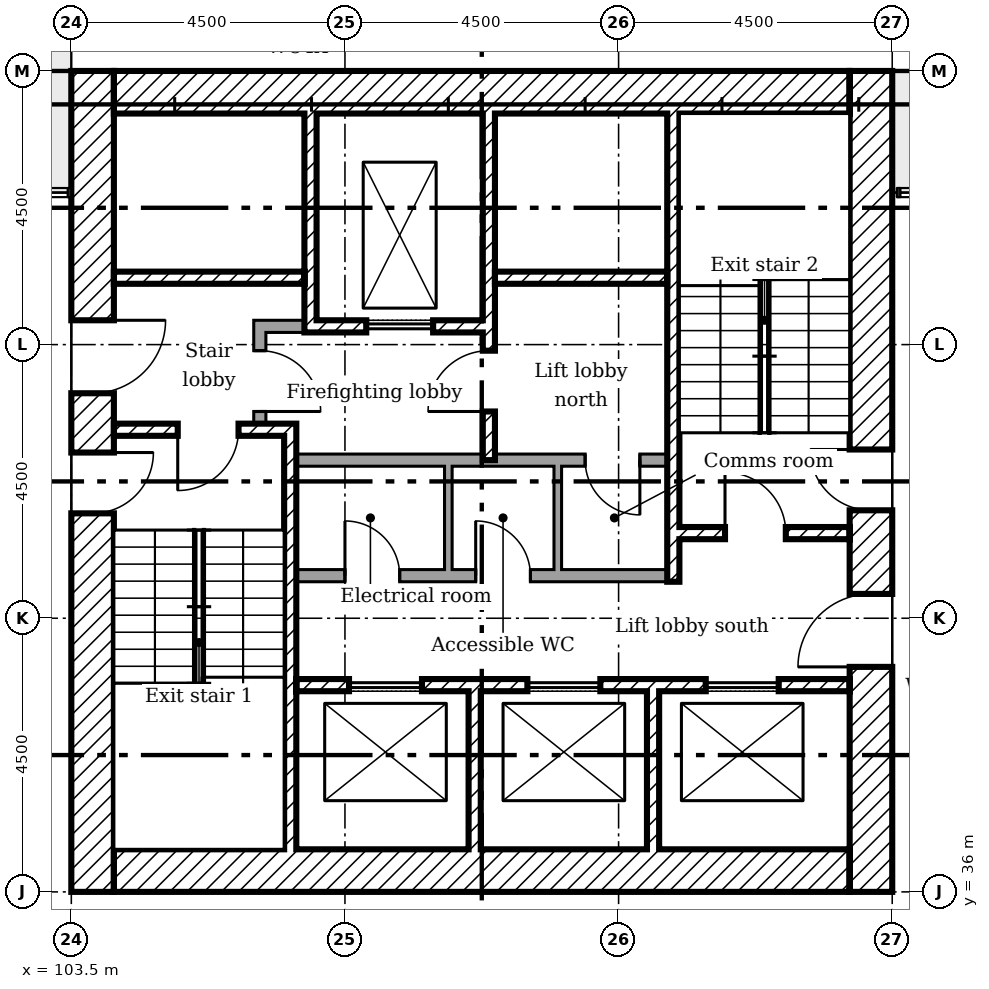
"""IFC4 building model, lengths in metres.
Left out: names, types, materials, properties, quantities, classifications, styles, units other than length and angle.
Written with IfcOpenShell. Run it as: python <this file> out.ifc"""

import sys

from ifc_helpers import new_model, si_unit, direction, frame, frame_2d, origin, place, context, subcontext, project, spatial, rectangle, extrude, element, fill, save


model = new_model("IFC4")
c1 = context("Model", 3, precision=1e-05, world=origin(), true_north=direction((0.0, 1.0)))
c2 = subcontext(c1, "Body", "Model", "MODEL_VIEW")
j1 = project(units=[si_unit("LENGTHUNIT", "METRE"), si_unit("PLANEANGLEUNIT", "RADIAN")], contexts=[c1])
p1 = place(None, origin())
s1 = spatial("IfcSite", under=j1, at=p1, CompositionType="ELEMENT")
p2 = place(p1, origin())
s2 = spatial("IfcBuilding", under=s1, at=p2, CompositionType="ELEMENT")
p3 = place(p2, frame((0.0, 0.0, 135.2)))
s3 = spatial("IfcBuildingStorey", under=s2, at=p3, CompositionType="ELEMENT", Elevation=135.2)
p4 = place(p3, frame((116.65, 36.0, 0.0), z_axis=(0.0, 0.0, 1.0), x_axis=(0.0, 1.0, 0.0)))
e1 = element("IfcWall", 1, at=p4, inside=s3, PredefinedType="SHEAR", context=c2, shape_type="SweptSolid", body=[
    extrude(rectangle(XDim=13.5, YDim=0.7, at=frame_2d((6.75, 0.0))), origin(), (0.0, 0.0, 1.0), 3.3),
])
p5 = place(p4, frame((3.7, 0.0, 0.0)))
e2 = element("IfcOpeningElement", 2, at=p5, cuts=e1, PredefinedType="OPENING", context=c2, shape_type="SweptSolid", body=[
    extrude(rectangle(XDim=1.2, YDim=2.1, at=frame_2d((0.6, 1.05))), frame((0.0, 0.36, 0.0), z_axis=(0.0, -1.0, 0.0), x_axis=(1.0, 0.0, 0.0)), (0.0, 0.0, 1.0), 0.72),
])
p6 = place(p4, frame((6.275, 0.0, 0.0)))
e3 = element("IfcOpeningElement", 3, at=p6, cuts=e1, PredefinedType="OPENING", context=c2, shape_type="SweptSolid", body=[
    extrude(rectangle(XDim=1.0, YDim=2.1, at=frame_2d((0.5, 1.05))), frame((0.0, 0.36, 0.0), z_axis=(0.0, -1.0, 0.0), x_axis=(1.0, 0.0, 0.0)), (0.0, 0.0, 1.0), 0.72),
])
for number, where in (
    (4, (104.2, 49.15, 0.0)),
    (5, (104.2, 36.35, 0.0)),
):
    element("IfcWall", number, at=place(p3, frame(where)), inside=s3, PredefinedType="SHEAR", context=c2, shape_type="SweptSolid", body=[
        extrude(rectangle(XDim=12.1, YDim=0.7, at=frame_2d((6.05, 0.0))), origin(), (0.0, 0.0, 1.0), 3.3),
    ])
p7 = place(p3, frame((103.85, 36.0, 0.0), z_axis=(0.0, 0.0, 1.0), x_axis=(0.0, 1.0, 0.0)))
e6 = element("IfcWall", 6, at=p7, inside=s3, PredefinedType="SHEAR", context=c2, shape_type="SweptSolid", body=[
    extrude(rectangle(XDim=13.5, YDim=0.7, at=frame_2d((6.75, 0.0))), origin(), (0.0, 0.0, 1.0), 3.3),
])
p8 = place(p7, frame((8.2, 0.0, 0.0)))
e7 = element("IfcOpeningElement", 7, at=p8, cuts=e6, PredefinedType="OPENING", context=c2, shape_type="SweptSolid", body=[
    extrude(rectangle(XDim=1.2, YDim=2.1, at=frame_2d((0.6, 1.05))), frame((0.0, 0.36, 0.0), z_axis=(0.0, -1.0, 0.0), x_axis=(1.0, 0.0, 0.0)), (0.0, 0.0, 1.0), 0.72),
])
p9 = place(p7, frame((6.225, 0.0, 0.0)))
e8 = element("IfcOpeningElement", 8, at=p9, cuts=e6, PredefinedType="OPENING", context=c2, shape_type="SweptSolid", body=[
    extrude(rectangle(XDim=1.0, YDim=2.1, at=frame_2d((0.5, 1.05))), frame((0.0, 0.36, 0.0), z_axis=(0.0, -1.0, 0.0), x_axis=(1.0, 0.0, 0.0)), (0.0, 0.0, 1.0), 0.72),
])
p10 = place(p3, frame((107.433, 48.8, 0.0), z_axis=(0.0, 0.0, 1.0), x_axis=(0.0, -1.0, 0.0)))
e9 = element("IfcWall", 9, at=p10, inside=s3, PredefinedType="SHEAR", context=c2, shape_type="SweptSolid", body=[
    extrude(rectangle(XDim=3.6, YDim=0.2, at=frame_2d((1.8, 0.0))), origin(), (0.0, 0.0, 1.0), 3.3),
])
p11 = place(p3, frame((110.367, 48.8, 0.0), z_axis=(0.0, 0.0, 1.0), x_axis=(0.0, -1.0, 0.0)))
e10 = element("IfcWall", 10, at=p11, inside=s3, PredefinedType="SHEAR", context=c2, shape_type="SweptSolid", body=[
    extrude(rectangle(XDim=5.7, YDim=0.2, at=frame_2d((2.85, 0.0))), origin(), (0.0, 0.0, 1.0), 3.3),
])
p12 = place(p11, frame((3.9, 0.0, 0.0)))
e11 = element("IfcOpeningElement", 11, at=p12, cuts=e10, PredefinedType="OPENING", context=c2, shape_type="SweptSolid", body=[
    extrude(rectangle(XDim=1.0, YDim=2.1, at=frame_2d((0.5, 1.05))), frame((0.0, 0.11, 0.0), z_axis=(0.0, -1.0, 0.0), x_axis=(1.0, 0.0, 0.0)), (0.0, 0.0, 1.0), 0.22),
])
for number, where, z_axis, x_axis in (
    (12, (110.133, 36.7, 0.0), (0.0, 0.0, 1.0), (0.0, 1.0, 0.0)),
    (13, (113.067, 36.7, 0.0), (0.0, 0.0, 1.0), (0.0, 1.0, 0.0)),
):
    element("IfcWall", number, at=place(p3, frame(where, z_axis=z_axis, x_axis=x_axis)), inside=s3, PredefinedType="SHEAR", context=c2, shape_type="SweptSolid", body=[
        extrude(rectangle(XDim=2.6, YDim=0.2, at=frame_2d((1.3, 0.0))), origin(), (0.0, 0.0, 1.0), 3.3),
    ])
p13 = place(p3, frame((106.5, 45.3, 0.0)))
e14 = element("IfcWall", 14, at=p13, inside=s3, PredefinedType="PARTITIONING", context=c2, shape_type="SweptSolid", body=[
    extrude(rectangle(XDim=0.833, YDim=0.2, at=frame_2d((0.417, 0.0))), origin(), (0.0, 0.0, 1.0), 3.3),
])
p14 = place(p3, frame((106.6, 43.7, 0.0), z_axis=(0.0, 0.0, 1.0), x_axis=(0.0, 1.0, 0.0)))
e15 = element("IfcWall", 15, at=p14, inside=s3, PredefinedType="PARTITIONING", context=c2, shape_type="SweptSolid", body=[
    extrude(rectangle(XDim=1.5, YDim=0.2, at=frame_2d((0.75, 0.0))), origin(), (0.0, 0.0, 1.0), 3.3),
])
p15 = place(p14, frame((0.2, 0.0, 0.0)))
e16 = element("IfcOpeningElement", 16, at=p15, cuts=e15, PredefinedType="OPENING", context=c2, shape_type="SweptSolid", body=[
    extrude(rectangle(XDim=1.0, YDim=2.1, at=frame_2d((0.5, 1.05))), frame((0.0, 0.11, 0.0), z_axis=(0.0, -1.0, 0.0), x_axis=(1.0, 0.0, 0.0)), (0.0, 0.0, 1.0), 0.22),
])
p16 = place(p3, frame((104.2, 46.1, 0.0)))
e17 = element("IfcWall", 17, at=p16, inside=s3, PredefinedType="SHEAR", context=c2, shape_type="SweptSolid", body=[
    extrude(rectangle(XDim=3.133, YDim=0.2, at=frame_2d((1.567, 0.0))), origin(), (0.0, 0.0, 1.0), 3.3),
])
p17 = place(p3, frame((110.467, 46.1, 0.0)))
e18 = element("IfcWall", 18, at=p17, inside=s3, PredefinedType="SHEAR", context=c2, shape_type="SweptSolid", body=[
    extrude(rectangle(XDim=2.833, YDim=0.2, at=frame_2d((1.417, 0.0))), origin(), (0.0, 0.0, 1.0), 3.3),
])
p18 = place(p3, frame((107.533, 45.3, 0.0)))
e19 = element("IfcWall", 19, at=p18, inside=s3, PredefinedType="SHEAR", context=c2, shape_type="SweptSolid", body=[
    extrude(rectangle(XDim=2.733, YDim=0.2, at=frame_2d((1.367, 0.0))), origin(), (0.0, 0.0, 1.0), 3.3),
])
p19 = place(p18, frame((0.817, 0.0, 0.0)))
e20 = element("IfcOpeningElement", 20, at=p19, cuts=e19, PredefinedType="OPENING", context=c2, shape_type="SweptSolid", body=[
    extrude(rectangle(XDim=1.1, YDim=2.1, at=frame_2d((0.55, 1.05))), frame((0.0, 0.11, 0.0), z_axis=(0.0, -1.0, 0.0), x_axis=(1.0, 0.0, 0.0)), (0.0, 0.0, 1.0), 0.22),
])
p20 = place(p3, frame((107.2, 39.4, 0.0)))
e21 = element("IfcWall", 21, at=p20, inside=s3, PredefinedType="SHEAR", context=c2, shape_type="SweptSolid", body=[
    extrude(rectangle(XDim=9.1, YDim=0.2, at=frame_2d((4.55, 0.0))), origin(), (0.0, 0.0, 1.0), 3.3),
])
p21 = place(p20, frame((0.867, 0.0, 0.0)))
e22 = element("IfcOpeningElement", 22, at=p21, cuts=e21, PredefinedType="OPENING", context=c2, shape_type="SweptSolid", body=[
    extrude(rectangle(XDim=1.2, YDim=2.1, at=frame_2d((0.6, 1.05))), frame((0.0, 0.11, 0.0), z_axis=(0.0, -1.0, 0.0), x_axis=(1.0, 0.0, 0.0)), (0.0, 0.0, 1.0), 0.22),
])
p22 = place(p20, frame((3.8, 0.0, 0.0)))
e23 = element("IfcOpeningElement", 23, at=p22, cuts=e21, PredefinedType="OPENING", context=c2, shape_type="SweptSolid", body=[
    extrude(rectangle(XDim=1.2, YDim=2.1, at=frame_2d((0.6, 1.05))), frame((0.0, 0.11, 0.0), z_axis=(0.0, -1.0, 0.0), x_axis=(1.0, 0.0, 0.0)), (0.0, 0.0, 1.0), 0.22),
])
p23 = place(p20, frame((6.733, 0.0, 0.0)))
e24 = element("IfcOpeningElement", 24, at=p23, cuts=e21, PredefinedType="OPENING", context=c2, shape_type="SweptSolid", body=[
    extrude(rectangle(XDim=1.2, YDim=2.1, at=frame_2d((0.6, 1.05))), frame((0.0, 0.11, 0.0), z_axis=(0.0, -1.0, 0.0), x_axis=(1.0, 0.0, 0.0)), (0.0, 0.0, 1.0), 0.22),
])
p24 = place(p3, frame((107.1, 36.7, 0.0), z_axis=(0.0, 0.0, 1.0), x_axis=(0.0, 1.0, 0.0)))
e25 = element("IfcWall", 25, at=p24, inside=s3, PredefinedType="SHEAR", context=c2, shape_type="SweptSolid", body=[
    extrude(rectangle(XDim=7.0, YDim=0.2, at=frame_2d((3.5, 0.0))), origin(), (0.0, 0.0, 1.0), 3.3),
])
p25 = place(p3, frame((104.2, 43.6, 0.0)))
e26 = element("IfcWall", 26, at=p25, inside=s3, PredefinedType="SHEAR", context=c2, shape_type="SweptSolid", body=[
    extrude(rectangle(XDim=2.8, YDim=0.2, at=frame_2d((1.4, 0.0))), origin(), (0.0, 0.0, 1.0), 3.3),
])
p26 = place(p25, frame((1.05, 0.0, 0.0)))
e27 = element("IfcOpeningElement", 27, at=p26, cuts=e26, PredefinedType="OPENING", context=c2, shape_type="SweptSolid", body=[
    extrude(rectangle(XDim=1.0, YDim=2.1, at=frame_2d((0.5, 1.05))), frame((0.0, 0.11, 0.0), z_axis=(0.0, -1.0, 0.0), x_axis=(1.0, 0.0, 0.0)), (0.0, 0.0, 1.0), 0.22),
])
p27 = place(p3, frame((113.5, 41.9, 0.0)))
e28 = element("IfcWall", 28, at=p27, inside=s3, PredefinedType="SHEAR", context=c2, shape_type="SweptSolid", body=[
    extrude(rectangle(XDim=2.8, YDim=0.2, at=frame_2d((1.4, 0.0))), origin(), (0.0, 0.0, 1.0), 3.3),
])
p28 = place(p27, frame((0.75, 0.0, 0.0)))
e29 = element("IfcOpeningElement", 29, at=p28, cuts=e28, PredefinedType="OPENING", context=c2, shape_type="SweptSolid", body=[
    extrude(rectangle(XDim=1.0, YDim=2.1, at=frame_2d((0.5, 1.05))), frame((0.0, 0.11, 0.0), z_axis=(0.0, -1.0, 0.0), x_axis=(1.0, 0.0, 0.0)), (0.0, 0.0, 1.0), 0.22),
])
p29 = place(p3, frame((113.4, 41.1, 0.0), z_axis=(0.0, 0.0, 1.0), x_axis=(0.0, 1.0, 0.0)))
e30 = element("IfcWall", 30, at=p29, inside=s3, PredefinedType="SHEAR", context=c2, shape_type="SweptSolid", body=[
    extrude(rectangle(XDim=7.7, YDim=0.2, at=frame_2d((3.85, 0.0))), origin(), (0.0, 0.0, 1.0), 3.3),
])
p30 = place(p3, frame((107.2, 43.1, 0.0)))
e31 = element("IfcWall", 31, at=p30, inside=s3, PredefinedType="PARTITIONING", context=c2, shape_type="SweptSolid", body=[
    extrude(rectangle(XDim=6.1, YDim=0.2, at=frame_2d((3.05, 0.0))), origin(), (0.0, 0.0, 1.0), 3.3),
])
p31 = place(p30, frame((4.75, 0.0, 0.0)))
e32 = element("IfcOpeningElement", 32, at=p31, cuts=e31, PredefinedType="OPENING", context=c2, shape_type="SweptSolid", body=[
    extrude(rectangle(XDim=0.9, YDim=2.1, at=frame_2d((0.45, 1.05))), frame((0.0, 0.11, 0.0), z_axis=(0.0, -1.0, 0.0), x_axis=(1.0, 0.0, 0.0)), (0.0, 0.0, 1.0), 0.22),
])
p32 = place(p3, frame((107.2, 41.2, 0.0)))
e33 = element("IfcWall", 33, at=p32, inside=s3, PredefinedType="PARTITIONING", context=c2, shape_type="SweptSolid", body=[
    extrude(rectangle(XDim=6.1, YDim=0.2, at=frame_2d((3.05, 0.0))), origin(), (0.0, 0.0, 1.0), 3.3),
])
p33 = place(p32, frame((0.8, 0.0, 0.0)))
e34 = element("IfcOpeningElement", 34, at=p33, cuts=e33, PredefinedType="OPENING", context=c2, shape_type="SweptSolid", body=[
    extrude(rectangle(XDim=0.9, YDim=2.1, at=frame_2d((0.45, 1.05))), frame((0.0, 0.11, 0.0), z_axis=(0.0, -1.0, 0.0), x_axis=(1.0, 0.0, 0.0)), (0.0, 0.0, 1.0), 0.22),
])
p34 = place(p32, frame((2.95, 0.0, 0.0)))
e35 = element("IfcOpeningElement", 35, at=p34, cuts=e33, PredefinedType="OPENING", context=c2, shape_type="SweptSolid", body=[
    extrude(rectangle(XDim=0.9, YDim=2.1, at=frame_2d((0.45, 1.05))), frame((0.0, 0.11, 0.0), z_axis=(0.0, -1.0, 0.0), x_axis=(1.0, 0.0, 0.0)), (0.0, 0.0, 1.0), 0.22),
])
for number, where, z_axis, x_axis in (
    (36, (109.7, 41.3, 0.0), (0.0, 0.0, 1.0), (0.0, 1.0, 0.0)),
    (37, (111.5, 41.3, 0.0), (0.0, 0.0, 1.0), (0.0, 1.0, 0.0)),
):
    element("IfcWall", number, at=place(p3, frame(where, z_axis=z_axis, x_axis=x_axis)), inside=s3, PredefinedType="PARTITIONING", context=c2, shape_type="SweptSolid", body=[
        extrude(rectangle(XDim=1.7, YDim=0.125, at=frame_2d((0.85, 0.0))), origin(), (0.0, 0.0, 1.0), 3.3),
    ])
p35 = place(p8, frame((1.2, 0.0, 0.0), x_axis=(-1.0, 0.0, 0.0)))
e38 = element("IfcDoor", 38, at=p35, inside=s3, OperationType="SINGLE_SWING_RIGHT", PredefinedType="DOOR", context=c2, shape_type="SweptSolid", body=[
    extrude(rectangle(XDim=1.2, YDim=2.1, at=frame_2d((0.6, 1.05))), frame((0.0, 0.025, 0.0), z_axis=(0.0, -1.0, 0.0), x_axis=(1.0, 0.0, 0.0)), (0.0, 0.0, 1.0), 0.05),
])
fill(e7, e38)
p36 = place(p5, origin())
e39 = element("IfcDoor", 39, at=p36, inside=s3, OperationType="SINGLE_SWING_RIGHT", PredefinedType="DOOR", context=c2, shape_type="SweptSolid", body=[
    extrude(rectangle(XDim=1.2, YDim=2.1, at=frame_2d((0.6, 1.05))), frame((0.0, 0.025, 0.0), z_axis=(0.0, -1.0, 0.0), x_axis=(1.0, 0.0, 0.0)), (0.0, 0.0, 1.0), 0.05),
])
fill(e2, e39)
p37 = place(p26, frame((1.0, 0.0, 0.0), x_axis=(-1.0, 0.0, 0.0)))
e40 = element("IfcDoor", 40, at=p37, inside=s3, OperationType="SINGLE_SWING_LEFT", PredefinedType="DOOR", context=c2, shape_type="SweptSolid", body=[
    extrude(rectangle(XDim=1.0, YDim=2.1, at=frame_2d((0.5, 1.05))), frame((0.0, 0.025, 0.0), z_axis=(0.0, -1.0, 0.0), x_axis=(1.0, 0.0, 0.0)), (0.0, 0.0, 1.0), 0.05),
])
fill(e27, e40)
p38 = place(p9, frame((1.0, 0.0, 0.0), x_axis=(-1.0, 0.0, 0.0)))
e41 = element("IfcDoor", 41, at=p38, inside=s3, OperationType="SINGLE_SWING_RIGHT", PredefinedType="DOOR", context=c2, shape_type="SweptSolid", body=[
    extrude(rectangle(XDim=1.0, YDim=2.1, at=frame_2d((0.5, 1.05))), frame((0.0, 0.025, 0.0), z_axis=(0.0, -1.0, 0.0), x_axis=(1.0, 0.0, 0.0)), (0.0, 0.0, 1.0), 0.05),
])
fill(e8, e41)
p39 = place(p28, origin())
e42 = element("IfcDoor", 42, at=p39, inside=s3, OperationType="SINGLE_SWING_RIGHT", PredefinedType="DOOR", context=c2, shape_type="SweptSolid", body=[
    extrude(rectangle(XDim=1.0, YDim=2.1, at=frame_2d((0.5, 1.05))), frame((0.0, 0.025, 0.0), z_axis=(0.0, -1.0, 0.0), x_axis=(1.0, 0.0, 0.0)), (0.0, 0.0, 1.0), 0.05),
])
fill(e29, e42)
p40 = place(p6, origin())
e43 = element("IfcDoor", 43, at=p40, inside=s3, OperationType="SINGLE_SWING_LEFT", PredefinedType="DOOR", context=c2, shape_type="SweptSolid", body=[
    extrude(rectangle(XDim=1.0, YDim=2.1, at=frame_2d((0.5, 1.05))), frame((0.0, 0.025, 0.0), z_axis=(0.0, -1.0, 0.0), x_axis=(1.0, 0.0, 0.0)), (0.0, 0.0, 1.0), 0.05),
])
fill(e3, e43)
p41 = place(p12, frame((1.0, 0.0, 0.0), x_axis=(-1.0, 0.0, 0.0)))
e44 = element("IfcDoor", 44, at=p41, inside=s3, OperationType="SINGLE_SWING_RIGHT", PredefinedType="DOOR", context=c2, shape_type="SweptSolid", body=[
    extrude(rectangle(XDim=1.0, YDim=2.1, at=frame_2d((0.5, 1.05))), frame((0.0, 0.025, 0.0), z_axis=(0.0, -1.0, 0.0), x_axis=(1.0, 0.0, 0.0)), (0.0, 0.0, 1.0), 0.05),
])
fill(e11, e44)
p42 = place(p15, frame((1.0, 0.0, 0.0), x_axis=(-1.0, 0.0, 0.0)))
e45 = element("IfcDoor", 45, at=p42, inside=s3, OperationType="SINGLE_SWING_LEFT", PredefinedType="DOOR", context=c2, shape_type="SweptSolid", body=[
    extrude(rectangle(XDim=1.0, YDim=2.1, at=frame_2d((0.5, 1.05))), frame((0.0, 0.025, 0.0), z_axis=(0.0, -1.0, 0.0), x_axis=(1.0, 0.0, 0.0)), (0.0, 0.0, 1.0), 0.05),
])
fill(e16, e45)
p43 = place(p33, origin())
e46 = element("IfcDoor", 46, at=p43, inside=s3, OperationType="SINGLE_SWING_RIGHT", PredefinedType="DOOR", context=c2, shape_type="SweptSolid", body=[
    extrude(rectangle(XDim=0.9, YDim=2.1, at=frame_2d((0.45, 1.05))), frame((0.0, 0.025, 0.0), z_axis=(0.0, -1.0, 0.0), x_axis=(1.0, 0.0, 0.0)), (0.0, 0.0, 1.0), 0.05),
])
fill(e34, e46)
p44 = place(p34, origin())
e47 = element("IfcDoor", 47, at=p44, inside=s3, OperationType="SINGLE_SWING_RIGHT", PredefinedType="DOOR", context=c2, shape_type="SweptSolid", body=[
    extrude(rectangle(XDim=0.9, YDim=2.1, at=frame_2d((0.45, 1.05))), frame((0.0, 0.025, 0.0), z_axis=(0.0, -1.0, 0.0), x_axis=(1.0, 0.0, 0.0)), (0.0, 0.0, 1.0), 0.05),
])
fill(e35, e47)
p45 = place(p31, frame((0.9, 0.0, 0.0), x_axis=(-1.0, 0.0, 0.0)))
e48 = element("IfcDoor", 48, at=p45, inside=s3, OperationType="SINGLE_SWING_RIGHT", PredefinedType="DOOR", context=c2, shape_type="SweptSolid", body=[
    extrude(rectangle(XDim=0.9, YDim=2.1, at=frame_2d((0.45, 1.05))), frame((0.0, 0.025, 0.0), z_axis=(0.0, -1.0, 0.0), x_axis=(1.0, 0.0, 0.0)), (0.0, 0.0, 1.0), 0.05),
])
fill(e32, e48)
p46 = place(p19, origin())
e49 = element("IfcDoor", 49, at=p46, inside=s3, OperationType="SLIDING_TO_LEFT", PredefinedType="DOOR", context=c2, shape_type="SweptSolid", body=[
    extrude(rectangle(XDim=1.1, YDim=2.1, at=frame_2d((0.55, 1.05))), frame((0.0, 0.025, 0.0), z_axis=(0.0, -1.0, 0.0), x_axis=(1.0, 0.0, 0.0)), (0.0, 0.0, 1.0), 0.05),
])
fill(e20, e49)
p47 = place(p21, origin())
e50 = element("IfcDoor", 50, at=p47, inside=s3, OperationType="SLIDING_TO_LEFT", PredefinedType="DOOR", context=c2, shape_type="SweptSolid", body=[
    extrude(rectangle(XDim=1.2, YDim=2.1, at=frame_2d((0.6, 1.05))), frame((0.0, 0.025, 0.0), z_axis=(0.0, -1.0, 0.0), x_axis=(1.0, 0.0, 0.0)), (0.0, 0.0, 1.0), 0.05),
])
fill(e22, e50)
p48 = place(p22, origin())
e51 = element("IfcDoor", 51, at=p48, inside=s3, OperationType="SLIDING_TO_LEFT", PredefinedType="DOOR", context=c2, shape_type="SweptSolid", body=[
    extrude(rectangle(XDim=1.2, YDim=2.1, at=frame_2d((0.6, 1.05))), frame((0.0, 0.025, 0.0), z_axis=(0.0, -1.0, 0.0), x_axis=(1.0, 0.0, 0.0)), (0.0, 0.0, 1.0), 0.05),
])
fill(e23, e51)
p49 = place(p23, origin())
e52 = element("IfcDoor", 52, at=p49, inside=s3, OperationType="SLIDING_TO_LEFT", PredefinedType="DOOR", context=c2, shape_type="SweptSolid", body=[
    extrude(rectangle(XDim=1.2, YDim=2.1, at=frame_2d((0.6, 1.05))), frame((0.0, 0.025, 0.0), z_axis=(0.0, -1.0, 0.0), x_axis=(1.0, 0.0, 0.0)), (0.0, 0.0, 1.0), 0.05),
])
fill(e24, e52)
save(model, sys.argv[1])
